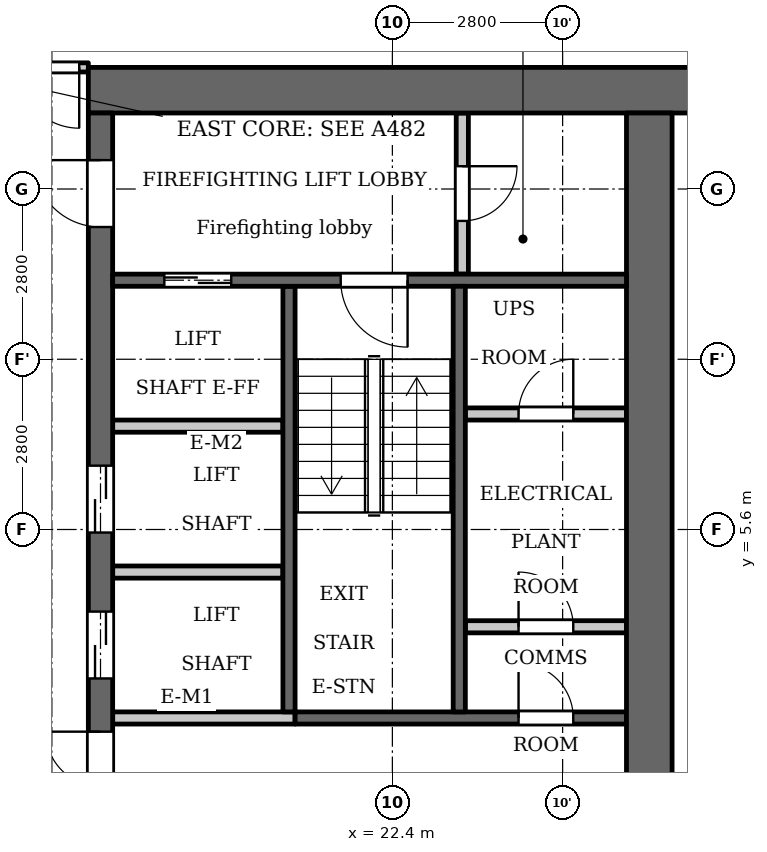
"""IFC4 building model, lengths in metres.
Left out: names, types, materials, properties, quantities, classifications, styles, units other than length and angle.
Written with IfcOpenShell. Run it as: python <this file> out.ifc"""

import sys

from ifc_helpers import new_model, si_unit, direction, frame, frame_2d, origin, place, context, subcontext, project, spatial, rectangle, extrude, element, fill, save


model = new_model("IFC4")
c1 = context("Model", 3, precision=1e-05, world=origin(), true_north=direction((0.0, 1.0)))
c2 = subcontext(c1, "Body", "Model", "MODEL_VIEW")
j1 = project(units=[si_unit("LENGTHUNIT", "METRE"), si_unit("PLANEANGLEUNIT", "RADIAN")], contexts=[c1])
p1 = place(None, origin())
s1 = spatial("IfcSite", under=j1, at=p1, CompositionType="ELEMENT")
p2 = place(p1, origin())
s2 = spatial("IfcBuilding", under=s1, at=p2, CompositionType="ELEMENT")
p3 = place(p2, frame((0.0, 0.0, 153.6)))
s3 = spatial("IfcBuildingStorey", under=s2, at=p3, CompositionType="ELEMENT", Elevation=153.6)
p4 = place(p3, frame((20.7, 2.6, 0.0), z_axis=(0.0, 0.0, 1.0), x_axis=(0.0, 1.0, 0.0)))
e1 = element("IfcWall", 1, at=p4, inside=s3, PredefinedType="SHEAR", context=c2, shape_type="SweptSolid", body=[
    extrude(rectangle(XDim=7.0, YDim=0.2, at=frame_2d((3.5, 0.0))), origin(), (0.0, 0.0, 1.0), 3.2),
])
p5 = place(p3, frame((20.8, 2.5, 0.0), z_axis=(0.0, 0.0, 1.0), x_axis=(1.0, 0.0, 0.0)))
e2 = element("IfcWall", 2, at=p5, inside=s3, PredefinedType="SHEAR", context=c2, shape_type="SweptSolid", body=[
    extrude(rectangle(XDim=5.45, YDim=0.2, at=frame_2d((2.725, 0.0))), origin(), (0.0, 0.0, 1.0), 3.2),
])
p6 = place(p5, frame((3.675, 0.0, 0.0)))
e3 = element("IfcOpeningElement", 3, at=p6, cuts=e2, PredefinedType="OPENING", context=c2, shape_type="SweptSolid", body=[
    extrude(rectangle(XDim=0.9, YDim=2.1, at=frame_2d((0.45, 1.05))), frame((0.0, 0.11, 0.0), z_axis=(0.0, -1.0, 0.0), x_axis=(1.0, 0.0, 0.0)), (0.0, 0.0, 1.0), 0.22),
])
p7 = place(p3, frame((17.4, 12.825, 0.0), z_axis=(0.0, 0.0, 1.0), x_axis=(1.0, 0.0, 0.0)))
e4 = element("IfcWall", 4, at=p7, inside=s3, PredefinedType="SHEAR", context=c2, shape_type="SweptSolid", body=[
    extrude(rectangle(XDim=10.4, YDim=0.75, at=frame_2d((5.2, 0.0))), origin(), (0.0, 0.0, 1.0), 3.2),
])
p8 = place(p3, frame((17.6, -12.45, 0.0), z_axis=(0.0, 0.0, 1.0), x_axis=(0.0, 1.0, 0.0)))
e5 = element("IfcWall", 5, at=p8, inside=s3, PredefinedType="SHEAR", context=c2, shape_type="SweptSolid", body=[
    extrude(rectangle(XDim=24.9, YDim=0.4, at=frame_2d((12.45, 0.0))), origin(), (0.0, 0.0, 1.0), 3.2),
])
p9 = place(p8, frame((6.325, 0.0, 0.0)))
e6 = element("IfcOpeningElement", 6, at=p9, cuts=e5, PredefinedType="OPENING", context=c2, shape_type="SweptSolid", body=[
    extrude(rectangle(XDim=0.9, YDim=2.1, at=frame_2d((0.45, 1.05))), frame((0.0, 0.21, 0.0), z_axis=(0.0, -1.0, 0.0), x_axis=(1.0, 0.0, 0.0)), (0.0, 0.0, 1.0), 0.42),
])
p10 = place(p8, frame((9.925, 0.0, 0.0)))
e7 = element("IfcOpeningElement", 7, at=p10, cuts=e5, PredefinedType="OPENING", context=c2, shape_type="SweptSolid", body=[
    extrude(rectangle(XDim=0.9, YDim=2.1, at=frame_2d((0.45, 1.05))), frame((0.0, 0.21, 0.0), z_axis=(0.0, -1.0, 0.0), x_axis=(1.0, 0.0, 0.0)), (0.0, 0.0, 1.0), 0.42),
])
p11 = place(p8, frame((15.6, 0.0, 0.0)))
e8 = element("IfcOpeningElement", 8, at=p11, cuts=e5, PredefinedType="OPENING", context=c2, shape_type="SweptSolid", body=[
    extrude(rectangle(XDim=1.1, YDim=2.1, at=frame_2d((0.55, 1.05))), frame((0.0, 0.21, 0.0), z_axis=(0.0, -1.0, 0.0), x_axis=(1.0, 0.0, 0.0)), (0.0, 0.0, 1.0), 0.42),
])
p12 = place(p8, frame((18.0, 0.0, 0.0)))
e9 = element("IfcOpeningElement", 9, at=p12, cuts=e5, PredefinedType="OPENING", context=c2, shape_type="SweptSolid", body=[
    extrude(rectangle(XDim=1.1, YDim=2.1, at=frame_2d((0.55, 1.05))), frame((0.0, 0.21, 0.0), z_axis=(0.0, -1.0, 0.0), x_axis=(1.0, 0.0, 0.0)), (0.0, 0.0, 1.0), 0.42),
])
p13 = place(p8, frame((23.025, 0.0, 0.0)))
e10 = element("IfcOpeningElement", 10, at=p13, cuts=e5, PredefinedType="OPENING", context=c2, shape_type="SweptSolid", body=[
    extrude(rectangle(XDim=1.1, YDim=2.1, at=frame_2d((0.55, 1.05))), frame((0.0, 0.21, 0.0), z_axis=(0.0, -1.0, 0.0), x_axis=(1.0, 0.0, 0.0)), (0.0, 0.0, 1.0), 0.42),
])
p14 = place(p8, frame((0.775, 0.0, 0.0)))
e11 = element("IfcOpeningElement", 11, at=p14, cuts=e5, PredefinedType="OPENING", context=c2, shape_type="SweptSolid", body=[
    extrude(rectangle(XDim=1.1, YDim=2.1, at=frame_2d((0.55, 1.05))), frame((0.0, 0.21, 0.0), z_axis=(0.0, -1.0, 0.0), x_axis=(1.0, 0.0, 0.0)), (0.0, 0.0, 1.0), 0.42),
])
p15 = place(p8, frame((12.925, 0.0, 0.0)))
e12 = element("IfcOpeningElement", 12, at=p15, cuts=e5, PredefinedType="OPENING", context=c2, shape_type="SweptSolid", body=[
    extrude(rectangle(XDim=1.8, YDim=2.1, at=frame_2d((0.9, 1.05))), frame((0.0, 0.21, 0.0), z_axis=(0.0, -1.0, 0.0), x_axis=(1.0, 0.0, 0.0)), (0.0, 0.0, 1.0), 0.42),
])
p16 = place(p3, frame((26.625, -12.45, 0.0), z_axis=(0.0, 0.0, 1.0), x_axis=(0.0, 1.0, 0.0)))
e13 = element("IfcWall", 13, at=p16, inside=s3, PredefinedType="SHEAR", context=c2, shape_type="SweptSolid", body=[
    extrude(rectangle(XDim=24.9, YDim=0.75, at=frame_2d((12.45, 0.0))), origin(), (0.0, 0.0, 1.0), 3.2),
])
p17 = place(p3, frame((23.55, 9.8, 0.0), z_axis=(0.0, 0.0, 1.0), x_axis=(0.0, 1.0, 0.0)))
e14 = element("IfcWall", 14, at=p17, inside=s3, PredefinedType="PARTITIONING", context=c2, shape_type="SweptSolid", body=[
    extrude(rectangle(XDim=2.65, YDim=0.2, at=frame_2d((1.325, 0.0))), origin(), (0.0, 0.0, 1.0), 3.2),
])
p18 = place(p17, frame((0.875, 0.0, 0.0)))
e15 = element("IfcOpeningElement", 15, at=p18, cuts=e14, PredefinedType="OPENING", context=c2, shape_type="SweptSolid", body=[
    extrude(rectangle(XDim=0.9, YDim=2.1, at=frame_2d((0.45, 1.05))), frame((0.0, 0.11, 0.0), z_axis=(0.0, -1.0, 0.0), x_axis=(1.0, 0.0, 0.0)), (0.0, 0.0, 1.0), 0.22),
])
p19 = place(p3, frame((23.6, 4.0, 0.0), z_axis=(0.0, 0.0, 1.0), x_axis=(1.0, 0.0, 0.0)))
e16 = element("IfcWall", 16, at=p19, inside=s3, PredefinedType="PARTITIONING", context=c2, shape_type="SweptSolid", body=[
    extrude(rectangle(XDim=2.65, YDim=0.2, at=frame_2d((1.325, 0.0))), origin(), (0.0, 0.0, 1.0), 3.2),
])
p20 = place(p19, frame((0.875, 0.0, 0.0)))
e17 = element("IfcOpeningElement", 17, at=p20, cuts=e16, PredefinedType="OPENING", context=c2, shape_type="SweptSolid", body=[
    extrude(rectangle(XDim=0.9, YDim=2.1, at=frame_2d((0.45, 1.05))), frame((0.0, 0.11, 0.0), z_axis=(0.0, -1.0, 0.0), x_axis=(1.0, 0.0, 0.0)), (0.0, 0.0, 1.0), 0.22),
])
p21 = place(p3, frame((23.6, 7.5, 0.0), z_axis=(0.0, 0.0, 1.0), x_axis=(1.0, 0.0, 0.0)))
e18 = element("IfcWall", 18, at=p21, inside=s3, PredefinedType="PARTITIONING", context=c2, shape_type="SweptSolid", body=[
    extrude(rectangle(XDim=2.65, YDim=0.2, at=frame_2d((1.325, 0.0))), origin(), (0.0, 0.0, 1.0), 3.2),
])
p22 = place(p21, frame((0.875, 0.0, 0.0)))
e19 = element("IfcOpeningElement", 19, at=p22, cuts=e18, PredefinedType="OPENING", context=c2, shape_type="SweptSolid", body=[
    extrude(rectangle(XDim=0.9, YDim=2.1, at=frame_2d((0.45, 1.05))), frame((0.0, 0.11, 0.0), z_axis=(0.0, -1.0, 0.0), x_axis=(1.0, 0.0, 0.0)), (0.0, 0.0, 1.0), 0.22),
])
p23 = place(p3, frame((17.8, 2.5, 0.0), z_axis=(0.0, 0.0, 1.0), x_axis=(1.0, 0.0, 0.0)))
e20 = element("IfcWall", 20, at=p23, inside=s3, PredefinedType="PARTITIONING", context=c2, shape_type="SweptSolid", body=[
    extrude(rectangle(XDim=3.0, YDim=0.2, at=frame_2d((1.5, 0.0))), origin(), (0.0, 0.0, 1.0), 3.2),
])
for number, where, z_axis, x_axis in (
    (21, (17.8, 4.9, 0.0), (0.0, 0.0, 1.0), (1.0, 0.0, 0.0)),
    (22, (17.8, 7.3, 0.0), (0.0, 0.0, 1.0), (1.0, 0.0, 0.0)),
):
    element("IfcWall", number, at=place(p3, frame(where, z_axis=z_axis, x_axis=x_axis)), inside=s3, PredefinedType="PARTITIONING", context=c2, shape_type="SweptSolid", body=[
        extrude(rectangle(XDim=2.8, YDim=0.2, at=frame_2d((1.4, 0.0))), origin(), (0.0, 0.0, 1.0), 3.2),
    ])
p24 = place(p3, frame((17.8, 9.7, 0.0), z_axis=(0.0, 0.0, 1.0), x_axis=(1.0, 0.0, 0.0)))
e23 = element("IfcWall", 23, at=p24, inside=s3, PredefinedType="SHEAR", context=c2, shape_type="SweptSolid", body=[
    extrude(rectangle(XDim=8.45, YDim=0.2, at=frame_2d((4.225, 0.0))), origin(), (0.0, 0.0, 1.0), 3.2),
])
p25 = place(p24, frame((0.85, 0.0, 0.0)))
e24 = element("IfcOpeningElement", 24, at=p25, cuts=e23, PredefinedType="OPENING", context=c2, shape_type="SweptSolid", body=[
    extrude(rectangle(XDim=1.1, YDim=2.1, at=frame_2d((0.55, 1.05))), frame((0.0, 0.11, 0.0), z_axis=(0.0, -1.0, 0.0), x_axis=(1.0, 0.0, 0.0)), (0.0, 0.0, 1.0), 0.22),
])
p26 = place(p24, frame((3.75, 0.0, 0.0)))
e25 = element("IfcOpeningElement", 25, at=p26, cuts=e23, PredefinedType="OPENING", context=c2, shape_type="SweptSolid", body=[
    extrude(rectangle(XDim=1.1, YDim=2.1, at=frame_2d((0.55, 1.05))), frame((0.0, 0.11, 0.0), z_axis=(0.0, -1.0, 0.0), x_axis=(1.0, 0.0, 0.0)), (0.0, 0.0, 1.0), 0.22),
])
p27 = place(p3, frame((23.5, 2.6, 0.0), z_axis=(0.0, 0.0, 1.0), x_axis=(0.0, 1.0, 0.0)))
e26 = element("IfcWall", 26, at=p27, inside=s3, PredefinedType="SHEAR", context=c2, shape_type="SweptSolid", body=[
    extrude(rectangle(XDim=7.0, YDim=0.2, at=frame_2d((3.5, 0.0))), origin(), (0.0, 0.0, 1.0), 3.2),
])
p28 = place(p3, frame((-17.4, 13.2, 0.0), z_axis=(0.0, 0.0, 1.0), x_axis=(1.0, 0.0, 0.0)))
e27 = element("IfcWall", 27, at=p28, inside=s3, PredefinedType="PARTITIONING", context=c2, shape_type="SweptSolid", body=[
    extrude(rectangle(XDim=34.8, YDim=0.15, at=frame_2d((17.4, 0.0))), origin(), (0.0, 0.0, 1.0), 3.2),
])
p29 = place(p28, frame((0.25, 0.0, 0.0)))
e28 = element("IfcOpeningElement", 28, at=p29, cuts=e27, PredefinedType="OPENING", context=c2, shape_type="SweptSolid", body=[
    extrude(rectangle(XDim=1.0, YDim=2.1, at=frame_2d((0.5, 1.05))), frame((0.0, 0.085, 0.0), z_axis=(0.0, -1.0, 0.0), x_axis=(1.0, 0.0, 0.0)), (0.0, 0.0, 1.0), 0.17),
])
p30 = place(p28, frame((33.65, 0.0, 0.0)))
e29 = element("IfcOpeningElement", 29, at=p30, cuts=e27, PredefinedType="OPENING", context=c2, shape_type="SweptSolid", body=[
    extrude(rectangle(XDim=1.0, YDim=2.1, at=frame_2d((0.5, 1.05))), frame((0.0, 0.085, 0.0), z_axis=(0.0, -1.0, 0.0), x_axis=(1.0, 0.0, 0.0)), (0.0, 0.0, 1.0), 0.17),
])
p31 = place(p28, frame((13.75, 0.0, 0.0)))
e30 = element("IfcOpeningElement", 30, at=p31, cuts=e27, PredefinedType="OPENING", context=c2, shape_type="SweptSolid", body=[
    extrude(rectangle(XDim=1.0, YDim=2.1, at=frame_2d((0.5, 1.05))), frame((0.0, 0.085, 0.0), z_axis=(0.0, -1.0, 0.0), x_axis=(1.0, 0.0, 0.0)), (0.0, 0.0, 1.0), 0.17),
])
p32 = place(p11, origin())
e31 = element("IfcDoor", 31, at=p32, inside=s3, OperationType="DOUBLE_DOOR_SLIDING", PredefinedType="DOOR", context=c2, shape_type="SweptSolid", body=[
    extrude(rectangle(XDim=1.1, YDim=2.1, at=frame_2d((0.55, 1.05))), frame((0.0, 0.025, 0.0), z_axis=(0.0, -1.0, 0.0), x_axis=(1.0, 0.0, 0.0)), (0.0, 0.0, 1.0), 0.05),
])
fill(e8, e31)
p33 = place(p12, origin())
e32 = element("IfcDoor", 32, at=p33, inside=s3, OperationType="DOUBLE_DOOR_SLIDING", PredefinedType="DOOR", context=c2, shape_type="SweptSolid", body=[
    extrude(rectangle(XDim=1.1, YDim=2.1, at=frame_2d((0.55, 1.05))), frame((0.0, 0.025, 0.0), z_axis=(0.0, -1.0, 0.0), x_axis=(1.0, 0.0, 0.0)), (0.0, 0.0, 1.0), 0.05),
])
fill(e9, e32)
p34 = place(p25, origin())
e33 = element("IfcDoor", 33, at=p34, inside=s3, OperationType="DOUBLE_DOOR_SLIDING", PredefinedType="DOOR", context=c2, shape_type="SweptSolid", body=[
    extrude(rectangle(XDim=1.1, YDim=2.1, at=frame_2d((0.55, 1.05))), frame((0.0, 0.025, 0.0), z_axis=(0.0, -1.0, 0.0), x_axis=(1.0, 0.0, 0.0)), (0.0, 0.0, 1.0), 0.05),
])
fill(e24, e33)
p35 = place(p13, origin())
e34 = element("IfcDoor", 34, at=p35, inside=s3, OperationType="SINGLE_SWING_LEFT", PredefinedType="DOOR", context=c2, shape_type="SweptSolid", body=[
    extrude(rectangle(XDim=1.1, YDim=2.1, at=frame_2d((0.55, 1.05))), frame((0.0, 0.025, 0.0), z_axis=(0.0, -1.0, 0.0), x_axis=(1.0, 0.0, 0.0)), (0.0, 0.0, 1.0), 0.05),
])
fill(e10, e34)
p36 = place(p18, origin())
e35 = element("IfcDoor", 35, at=p36, inside=s3, OperationType="SINGLE_SWING_RIGHT", PredefinedType="DOOR", context=c2, shape_type="SweptSolid", body=[
    extrude(rectangle(XDim=0.9, YDim=2.1, at=frame_2d((0.45, 1.05))), frame((0.0, 0.025, 0.0), z_axis=(0.0, -1.0, 0.0), x_axis=(1.0, 0.0, 0.0)), (0.0, 0.0, 1.0), 0.05),
])
fill(e15, e35)
p37 = place(p26, origin())
e36 = element("IfcDoor", 36, at=p37, inside=s3, OperationType="SINGLE_SWING_RIGHT", PredefinedType="DOOR", context=c2, shape_type="SweptSolid", body=[
    extrude(rectangle(XDim=1.1, YDim=2.1, at=frame_2d((0.55, 1.05))), frame((0.0, 0.025, 0.0), z_axis=(0.0, -1.0, 0.0), x_axis=(1.0, 0.0, 0.0)), (0.0, 0.0, 1.0), 0.05),
])
fill(e25, e36)
p38 = place(p15, origin())
e37 = element("IfcDoor", 37, at=p38, inside=s3, OperationType="DOUBLE_DOOR_SINGLE_SWING", PredefinedType="DOOR", context=c2, shape_type="SweptSolid", body=[
    extrude(rectangle(XDim=1.8, YDim=2.1, at=frame_2d((0.9, 1.05))), frame((0.0, 0.025, 0.0), z_axis=(0.0, -1.0, 0.0), x_axis=(1.0, 0.0, 0.0)), (0.0, 0.0, 1.0), 0.05),
])
fill(e12, e37)
p39 = place(p20, origin())
e38 = element("IfcDoor", 38, at=p39, inside=s3, OperationType="SINGLE_SWING_RIGHT", PredefinedType="DOOR", context=c2, shape_type="SweptSolid", body=[
    extrude(rectangle(XDim=0.9, YDim=2.1, at=frame_2d((0.45, 1.05))), frame((0.0, 0.025, 0.0), z_axis=(0.0, -1.0, 0.0), x_axis=(1.0, 0.0, 0.0)), (0.0, 0.0, 1.0), 0.05),
])
fill(e17, e38)
p40 = place(p22, origin())
e39 = element("IfcDoor", 39, at=p40, inside=s3, OperationType="SINGLE_SWING_LEFT", PredefinedType="DOOR", context=c2, shape_type="SweptSolid", body=[
    extrude(rectangle(XDim=0.9, YDim=2.1, at=frame_2d((0.45, 1.05))), frame((0.0, 0.025, 0.0), z_axis=(0.0, -1.0, 0.0), x_axis=(1.0, 0.0, 0.0)), (0.0, 0.0, 1.0), 0.05),
])
fill(e19, e39)
p41 = place(p6, origin())
e40 = element("IfcDoor", 40, at=p41, inside=s3, OperationType="SINGLE_SWING_RIGHT", PredefinedType="DOOR", context=c2, shape_type="SweptSolid", body=[
    extrude(rectangle(XDim=0.9, YDim=2.1, at=frame_2d((0.45, 1.05))), frame((0.0, 0.025, 0.0), z_axis=(0.0, -1.0, 0.0), x_axis=(1.0, 0.0, 0.0)), (0.0, 0.0, 1.0), 0.05),
])
fill(e3, e40)
p42 = place(p30, origin())
e41 = element("IfcDoor", 41, at=p42, inside=s3, OperationType="SINGLE_SWING_RIGHT", PredefinedType="DOOR", context=c2, shape_type="SweptSolid", body=[
    extrude(rectangle(XDim=1.0, YDim=2.1, at=frame_2d((0.5, 1.05))), frame((0.0, 0.025, 0.0), z_axis=(0.0, -1.0, 0.0), x_axis=(1.0, 0.0, 0.0)), (0.0, 0.0, 1.0), 0.05),
])
fill(e29, e41)
save(model, sys.argv[1])
